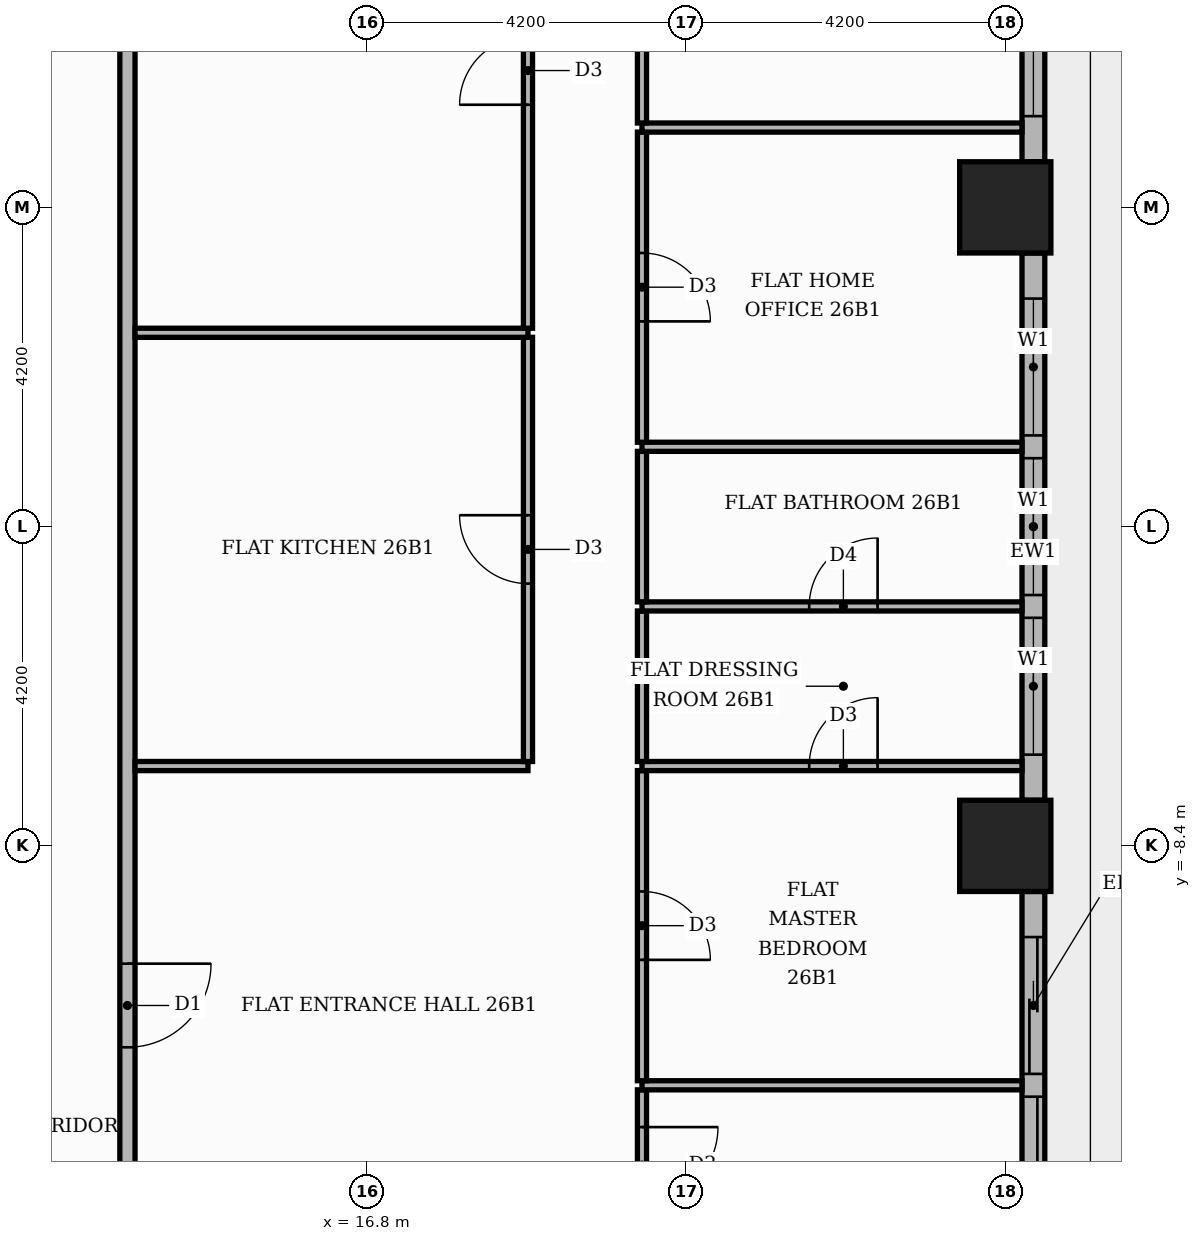
"""IFC4 building model, lengths in metres.
Left out: names, types, materials, properties, quantities, classifications, styles, units other than length and angle.
Written with IfcOpenShell. Run it as: python <this file> out.ifc"""

import sys

from ifc_helpers import new_model, si_unit, direction, frame, frame_2d, origin, origin_2d, place, context, subcontext, project, spatial, rectangle, extrude, element, fill, save


model = new_model("IFC4")
c1 = context("Model", 3, precision=1e-05, world=origin(), true_north=direction((0.0, 1.0)))
c2 = subcontext(c1, "Body", "Model", "MODEL_VIEW")
j1 = project(units=[si_unit("LENGTHUNIT", "METRE"), si_unit("PLANEANGLEUNIT", "RADIAN")], contexts=[c1])
p1 = place(None, origin())
s1 = spatial("IfcSite", under=j1, at=p1, CompositionType="ELEMENT")
p2 = place(p1, origin())
s2 = spatial("IfcBuilding", under=s1, at=p2, CompositionType="ELEMENT")
p3 = place(p2, frame((0.0, 0.0, 110.4)))
s3 = spatial("IfcBuildingStorey", under=s2, at=p3, CompositionType="ELEMENT", Elevation=110.4)
for number, where, z_axis, x_axis in (
    (1, (25.2, 0.0, 0.0), (0.0, 0.0, 1.0), (1.0, 0.0, 0.0)),
    (2, (25.2, -8.4, 0.0), (0.0, 0.0, 1.0), (1.0, 0.0, 0.0)),
):
    element("IfcColumn", number, at=place(p3, frame(where, z_axis=z_axis, x_axis=x_axis)), inside=s3, PredefinedType="COLUMN", context=c2, shape_type="SweptSolid", body=[
        extrude(rectangle(XDim=1.2, YDim=1.2, at=origin_2d()), origin(), (0.0, 0.0, 1.0), 3.9),
    ])
p4 = place(p3, frame((25.57, -16.2, 0.0), z_axis=(0.0, 0.0, 1.0), x_axis=(0.0, 1.0, 0.0)))
e3 = element("IfcWall", 3, at=p4, inside=s3, PredefinedType="STANDARD", context=c2, shape_type="SweptSolid", body=[
    extrude(rectangle(XDim=7.2, YDim=0.3, at=frame_2d((3.6, 0.0))), origin(), (0.0, 0.0, 1.0), 3.48),
])
p5 = place(p4, frame((0.6, 0.0, 0.0)))
e4 = element("IfcOpeningElement", 4, at=p5, cuts=e3, PredefinedType="OPENING", context=c2, shape_type="SweptSolid", body=[
    extrude(rectangle(XDim=3.9, YDim=2.4, at=frame_2d((1.95, 1.2))), frame((0.0, 0.16, 0.0), z_axis=(0.0, -1.0, 0.0), x_axis=(1.0, 0.0, 0.0)), (0.0, 0.0, 1.0), 0.32),
])
p6 = place(p4, frame((4.8, 0.0, 0.0)))
e5 = element("IfcOpeningElement", 5, at=p6, cuts=e3, PredefinedType="OPENING", context=c2, shape_type="SweptSolid", body=[
    extrude(rectangle(XDim=1.8, YDim=2.4, at=frame_2d((0.9, 1.2))), frame((0.0, 0.16, 0.0), z_axis=(0.0, -1.0, 0.0), x_axis=(1.0, 0.0, 0.0)), (0.0, 0.0, 1.0), 0.32),
])
p7 = place(p3, frame((25.57, -7.8, 0.0), z_axis=(0.0, 0.0, 1.0), x_axis=(0.0, 1.0, 0.0)))
e6 = element("IfcWall", 6, at=p7, inside=s3, PredefinedType="STANDARD", context=c2, shape_type="SweptSolid", body=[
    extrude(rectangle(XDim=7.2, YDim=0.3, at=frame_2d((3.6, 0.0))), origin(), (0.0, 0.0, 1.0), 3.48),
])
p8 = place(p7, frame((0.6, 0.0, 0.9)))
e7 = element("IfcOpeningElement", 7, at=p8, cuts=e6, PredefinedType="OPENING", context=c2, shape_type="SweptSolid", body=[
    extrude(rectangle(XDim=1.8, YDim=2.1, at=frame_2d((0.9, 1.05))), frame((0.0, 0.16, 0.0), z_axis=(0.0, -1.0, 0.0), x_axis=(1.0, 0.0, 0.0)), (0.0, 0.0, 1.0), 0.32),
])
p9 = place(p7, frame((2.7, 0.0, 0.9)))
e8 = element("IfcOpeningElement", 8, at=p9, cuts=e6, PredefinedType="OPENING", context=c2, shape_type="SweptSolid", body=[
    extrude(rectangle(XDim=1.8, YDim=2.1, at=frame_2d((0.9, 1.05))), frame((0.0, 0.16, 0.0), z_axis=(0.0, -1.0, 0.0), x_axis=(1.0, 0.0, 0.0)), (0.0, 0.0, 1.0), 0.32),
])
p10 = place(p7, frame((4.8, 0.0, 0.9)))
e9 = element("IfcOpeningElement", 9, at=p10, cuts=e6, PredefinedType="OPENING", context=c2, shape_type="SweptSolid", body=[
    extrude(rectangle(XDim=1.8, YDim=2.1, at=frame_2d((0.9, 1.05))), frame((0.0, 0.16, 0.0), z_axis=(0.0, -1.0, 0.0), x_axis=(1.0, 0.0, 0.0)), (0.0, 0.0, 1.0), 0.32),
])
p11 = place(p3, frame((25.57, 0.6, 0.0), z_axis=(0.0, 0.0, 1.0), x_axis=(0.0, 1.0, 0.0)))
e10 = element("IfcWall", 10, at=p11, inside=s3, PredefinedType="STANDARD", context=c2, shape_type="SweptSolid", body=[
    extrude(rectangle(XDim=7.2, YDim=0.3, at=frame_2d((3.6, 0.0))), origin(), (0.0, 0.0, 1.0), 3.48),
])
p12 = place(p11, frame((0.6, 0.0, 0.9)))
e11 = element("IfcOpeningElement", 11, at=p12, cuts=e10, PredefinedType="OPENING", context=c2, shape_type="SweptSolid", body=[
    extrude(rectangle(XDim=3.9, YDim=2.1, at=frame_2d((1.95, 1.05))), frame((0.0, 0.16, 0.0), z_axis=(0.0, -1.0, 0.0), x_axis=(1.0, 0.0, 0.0)), (0.0, 0.0, 1.0), 0.32),
])
p13 = place(p11, frame((4.8, 0.0, 0.9)))
e12 = element("IfcOpeningElement", 12, at=p13, cuts=e10, PredefinedType="OPENING", context=c2, shape_type="SweptSolid", body=[
    extrude(rectangle(XDim=1.8, YDim=2.1, at=frame_2d((0.9, 1.05))), frame((0.0, 0.16, 0.0), z_axis=(0.0, -1.0, 0.0), x_axis=(1.0, 0.0, 0.0)), (0.0, 0.0, 1.0), 0.32),
])
p14 = place(p3, frame((20.42, -13.59, 0.0), z_axis=(0.0, 0.0, 1.0), x_axis=(0.0, 1.0, 0.0)))
e13 = element("IfcWall", 13, at=p14, inside=s3, PredefinedType="PARTITIONING", context=c2, shape_type="SweptSolid", body=[
    extrude(rectangle(XDim=1.98, YDim=0.12, at=frame_2d((0.99, 0.0))), origin(), (0.0, 0.0, 1.0), 3.48),
])
p15 = place(p14, frame((0.49, 0.0, 0.0)))
e14 = element("IfcOpeningElement", 14, at=p15, cuts=e13, PredefinedType="OPENING", context=c2, shape_type="SweptSolid", body=[
    extrude(rectangle(XDim=1.0, YDim=2.1, at=frame_2d((0.5, 1.05))), frame((0.0, 0.07, 0.0), z_axis=(0.0, -1.0, 0.0), x_axis=(1.0, 0.0, 0.0)), (0.0, 0.0, 1.0), 0.14),
])
p16 = place(p3, frame((13.65, -13.55, 0.0), z_axis=(0.0, 0.0, 1.0), x_axis=(0.0, 1.0, 0.0)))
e15 = element("IfcWall", 15, at=p16, inside=s3, PredefinedType="PARTITIONING", context=c2, shape_type="SweptSolid", body=[
    extrude(rectangle(XDim=27.1, YDim=0.2, at=frame_2d((13.55, 0.0))), origin(), (0.0, 0.0, 1.0), 3.48),
])
p17 = place(p16, frame((2.5, 0.0, 0.0)))
e16 = element("IfcOpeningElement", 16, at=p17, cuts=e15, PredefinedType="OPENING", context=c2, shape_type="SweptSolid", body=[
    extrude(rectangle(XDim=1.1, YDim=2.4, at=frame_2d((0.55, 1.2))), frame((0.0, 0.11, 0.0), z_axis=(0.0, -1.0, 0.0), x_axis=(1.0, 0.0, 0.0)), (0.0, 0.0, 1.0), 0.22),
])
p18 = place(p3, frame((20.42, -11.55, 0.0), z_axis=(0.0, 0.0, 1.0), x_axis=(1.0, 0.0, 0.0)))
e17 = element("IfcWall", 17, at=p18, inside=s3, PredefinedType="PARTITIONING", context=c2, shape_type="SweptSolid", body=[
    extrude(rectangle(XDim=5.0, YDim=0.12, at=frame_2d((2.5, 0.0))), origin(), (0.0, 0.0, 1.0), 3.48),
])
p19 = place(p3, frame((20.42, -11.49, 0.0), z_axis=(0.0, 0.0, 1.0), x_axis=(0.0, 1.0, 0.0)))
e18 = element("IfcWall", 18, at=p19, inside=s3, PredefinedType="PARTITIONING", context=c2, shape_type="SweptSolid", body=[
    extrude(rectangle(XDim=4.08, YDim=0.12, at=frame_2d((2.04, 0.0))), origin(), (0.0, 0.0, 1.0), 3.48),
])
p20 = place(p19, frame((1.59, 0.0, 0.0)))
e19 = element("IfcOpeningElement", 19, at=p20, cuts=e18, PredefinedType="OPENING", context=c2, shape_type="SweptSolid", body=[
    extrude(rectangle(XDim=0.9, YDim=2.1, at=frame_2d((0.45, 1.05))), frame((0.0, 0.07, 0.0), z_axis=(0.0, -1.0, 0.0), x_axis=(1.0, 0.0, 0.0)), (0.0, 0.0, 1.0), 0.14),
])
p21 = place(p3, frame((13.75, -7.35, 0.0), z_axis=(0.0, 0.0, 1.0), x_axis=(1.0, 0.0, 0.0)))
e20 = element("IfcWall", 20, at=p21, inside=s3, PredefinedType="PARTITIONING", context=c2, shape_type="SweptSolid", body=[
    extrude(rectangle(XDim=5.17, YDim=0.12, at=frame_2d((2.585, 0.0))), origin(), (0.0, 0.0, 1.0), 3.48),
])
p22 = place(p3, frame((20.42, -7.35, 0.0), z_axis=(0.0, 0.0, 1.0), x_axis=(1.0, 0.0, 0.0)))
e21 = element("IfcWall", 21, at=p22, inside=s3, PredefinedType="PARTITIONING", context=c2, shape_type="SweptSolid", body=[
    extrude(rectangle(XDim=5.0, YDim=0.12, at=frame_2d((2.5, 0.0))), origin(), (0.0, 0.0, 1.0), 3.48),
])
p23 = place(p22, frame((2.2, 0.0, 0.0)))
e22 = element("IfcOpeningElement", 22, at=p23, cuts=e21, PredefinedType="OPENING", context=c2, shape_type="SweptSolid", body=[
    extrude(rectangle(XDim=0.9, YDim=2.1, at=frame_2d((0.45, 1.05))), frame((0.0, 0.07, 0.0), z_axis=(0.0, -1.0, 0.0), x_axis=(1.0, 0.0, 0.0)), (0.0, 0.0, 1.0), 0.14),
])
p24 = place(p3, frame((18.92, -7.29, 0.0), z_axis=(0.0, 0.0, 1.0), x_axis=(0.0, 1.0, 0.0)))
e23 = element("IfcWall", 23, at=p24, inside=s3, PredefinedType="PARTITIONING", context=c2, shape_type="SweptSolid", body=[
    extrude(rectangle(XDim=5.58, YDim=0.12, at=frame_2d((2.79, 0.0))), origin(), (0.0, 0.0, 1.0), 3.48),
])
p25 = place(p24, frame((2.34, 0.0, 0.0)))
e24 = element("IfcOpeningElement", 24, at=p25, cuts=e23, PredefinedType="OPENING", context=c2, shape_type="SweptSolid", body=[
    extrude(rectangle(XDim=0.9, YDim=2.1, at=frame_2d((0.45, 1.05))), frame((0.0, 0.07, 0.0), z_axis=(0.0, -1.0, 0.0), x_axis=(1.0, 0.0, 0.0)), (0.0, 0.0, 1.0), 0.14),
])
p26 = place(p3, frame((20.42, -7.29, 0.0), z_axis=(0.0, 0.0, 1.0), x_axis=(0.0, 1.0, 0.0)))
e25 = element("IfcWall", 25, at=p26, inside=s3, PredefinedType="PARTITIONING", context=c2, shape_type="SweptSolid", body=[
    extrude(rectangle(XDim=1.98, YDim=0.12, at=frame_2d((0.99, 0.0))), origin(), (0.0, 0.0, 1.0), 3.48),
])
p27 = place(p3, frame((20.42, -5.25, 0.0), z_axis=(0.0, 0.0, 1.0), x_axis=(1.0, 0.0, 0.0)))
e26 = element("IfcWall", 26, at=p27, inside=s3, PredefinedType="PARTITIONING", context=c2, shape_type="SweptSolid", body=[
    extrude(rectangle(XDim=5.0, YDim=0.12, at=frame_2d((2.5, 0.0))), origin(), (0.0, 0.0, 1.0), 3.48),
])
p28 = place(p27, frame((2.2, 0.0, 0.0)))
e27 = element("IfcOpeningElement", 27, at=p28, cuts=e26, PredefinedType="OPENING", context=c2, shape_type="SweptSolid", body=[
    extrude(rectangle(XDim=0.9, YDim=2.1, at=frame_2d((0.45, 1.05))), frame((0.0, 0.07, 0.0), z_axis=(0.0, -1.0, 0.0), x_axis=(1.0, 0.0, 0.0)), (0.0, 0.0, 1.0), 0.14),
])
p29 = place(p3, frame((20.42, -5.19, 0.0), z_axis=(0.0, 0.0, 1.0), x_axis=(0.0, 1.0, 0.0)))
e28 = element("IfcWall", 28, at=p29, inside=s3, PredefinedType="PARTITIONING", context=c2, shape_type="SweptSolid", body=[
    extrude(rectangle(XDim=1.98, YDim=0.12, at=frame_2d((0.99, 0.0))), origin(), (0.0, 0.0, 1.0), 3.48),
])
p30 = place(p3, frame((20.42, -3.15, 0.0), z_axis=(0.0, 0.0, 1.0), x_axis=(1.0, 0.0, 0.0)))
e29 = element("IfcWall", 29, at=p30, inside=s3, PredefinedType="PARTITIONING", context=c2, shape_type="SweptSolid", body=[
    extrude(rectangle(XDim=5.0, YDim=0.12, at=frame_2d((2.5, 0.0))), origin(), (0.0, 0.0, 1.0), 3.48),
])
p31 = place(p3, frame((20.42, -3.09, 0.0), z_axis=(0.0, 0.0, 1.0), x_axis=(0.0, 1.0, 0.0)))
e30 = element("IfcWall", 30, at=p31, inside=s3, PredefinedType="PARTITIONING", context=c2, shape_type="SweptSolid", body=[
    extrude(rectangle(XDim=4.08, YDim=0.12, at=frame_2d((2.04, 0.0))), origin(), (0.0, 0.0, 1.0), 3.48),
])
p32 = place(p31, frame((1.59, 0.0, 0.0)))
e31 = element("IfcOpeningElement", 31, at=p32, cuts=e30, PredefinedType="OPENING", context=c2, shape_type="SweptSolid", body=[
    extrude(rectangle(XDim=0.9, YDim=2.1, at=frame_2d((0.45, 1.05))), frame((0.0, 0.07, 0.0), z_axis=(0.0, -1.0, 0.0), x_axis=(1.0, 0.0, 0.0)), (0.0, 0.0, 1.0), 0.14),
])
p33 = place(p3, frame((13.75, -1.65, 0.0), z_axis=(0.0, 0.0, 1.0), x_axis=(1.0, 0.0, 0.0)))
e32 = element("IfcWall", 32, at=p33, inside=s3, PredefinedType="PARTITIONING", context=c2, shape_type="SweptSolid", body=[
    extrude(rectangle(XDim=5.17, YDim=0.12, at=frame_2d((2.585, 0.0))), origin(), (0.0, 0.0, 1.0), 3.48),
])
p34 = place(p3, frame((18.92, -1.59, 0.0), z_axis=(0.0, 0.0, 1.0), x_axis=(0.0, 1.0, 0.0)))
e33 = element("IfcWall", 33, at=p34, inside=s3, PredefinedType="PARTITIONING", context=c2, shape_type="SweptSolid", body=[
    extrude(rectangle(XDim=6.78, YDim=0.12, at=frame_2d((3.39, 0.0))), origin(), (0.0, 0.0, 1.0), 3.48),
])
p35 = place(p34, frame((2.94, 0.0, 0.0)))
e34 = element("IfcOpeningElement", 34, at=p35, cuts=e33, PredefinedType="OPENING", context=c2, shape_type="SweptSolid", body=[
    extrude(rectangle(XDim=0.9, YDim=2.1, at=frame_2d((0.45, 1.05))), frame((0.0, 0.07, 0.0), z_axis=(0.0, -1.0, 0.0), x_axis=(1.0, 0.0, 0.0)), (0.0, 0.0, 1.0), 0.14),
])
p36 = place(p3, frame((20.42, 1.05, 0.0), z_axis=(0.0, 0.0, 1.0), x_axis=(1.0, 0.0, 0.0)))
e35 = element("IfcWall", 35, at=p36, inside=s3, PredefinedType="PARTITIONING", context=c2, shape_type="SweptSolid", body=[
    extrude(rectangle(XDim=5.0, YDim=0.12, at=frame_2d((2.5, 0.0))), origin(), (0.0, 0.0, 1.0), 3.48),
])
p37 = place(p3, frame((20.42, 1.11, 0.0), z_axis=(0.0, 0.0, 1.0), x_axis=(0.0, 1.0, 0.0)))
e36 = element("IfcWall", 36, at=p37, inside=s3, PredefinedType="PARTITIONING", context=c2, shape_type="SweptSolid", body=[
    extrude(rectangle(XDim=4.08, YDim=0.12, at=frame_2d((2.04, 0.0))), origin(), (0.0, 0.0, 1.0), 3.48),
])
p38 = place(p37, frame((1.59, 0.0, 0.0)))
e37 = element("IfcOpeningElement", 37, at=p38, cuts=e36, PredefinedType="OPENING", context=c2, shape_type="SweptSolid", body=[
    extrude(rectangle(XDim=0.9, YDim=2.1, at=frame_2d((0.45, 1.05))), frame((0.0, 0.07, 0.0), z_axis=(0.0, -1.0, 0.0), x_axis=(1.0, 0.0, 0.0)), (0.0, 0.0, 1.0), 0.14),
])
p39 = place(p5, origin())
e38 = element("IfcDoor", 38, at=p39, inside=s3, OperationType="SLIDING_TO_LEFT", PredefinedType="DOOR", context=c2, shape_type="SweptSolid", body=[
    extrude(rectangle(XDim=3.9, YDim=2.4, at=frame_2d((1.95, 1.2))), frame((0.0, 0.025, 0.0), z_axis=(0.0, -1.0, 0.0), x_axis=(1.0, 0.0, 0.0)), (0.0, 0.0, 1.0), 0.05),
])
fill(e4, e38)
p40 = place(p6, origin())
e39 = element("IfcDoor", 39, at=p40, inside=s3, OperationType="SLIDING_TO_RIGHT", PredefinedType="DOOR", context=c2, shape_type="SweptSolid", body=[
    extrude(rectangle(XDim=1.8, YDim=2.4, at=frame_2d((0.9, 1.2))), frame((0.0, 0.025, 0.0), z_axis=(0.0, -1.0, 0.0), x_axis=(1.0, 0.0, 0.0)), (0.0, 0.0, 1.0), 0.05),
])
fill(e5, e39)
p41 = place(p8, origin())
e40 = element("IfcWindow", 40, at=p41, inside=s3, PartitioningType="SINGLE_PANEL", PredefinedType="WINDOW", context=c2, shape_type="SweptSolid", body=[
    extrude(rectangle(XDim=1.8, YDim=2.1, at=frame_2d((0.9, 1.05))), frame((0.0, 0.03, 0.0), z_axis=(0.0, -1.0, 0.0), x_axis=(1.0, 0.0, 0.0)), (0.0, 0.0, 1.0), 0.06),
])
fill(e7, e40)
p42 = place(p9, origin())
e41 = element("IfcWindow", 41, at=p42, inside=s3, PartitioningType="SINGLE_PANEL", PredefinedType="WINDOW", context=c2, shape_type="SweptSolid", body=[
    extrude(rectangle(XDim=1.8, YDim=2.1, at=frame_2d((0.9, 1.05))), frame((0.0, 0.03, 0.0), z_axis=(0.0, -1.0, 0.0), x_axis=(1.0, 0.0, 0.0)), (0.0, 0.0, 1.0), 0.06),
])
fill(e8, e41)
p43 = place(p10, origin())
e42 = element("IfcWindow", 42, at=p43, inside=s3, PartitioningType="SINGLE_PANEL", PredefinedType="WINDOW", context=c2, shape_type="SweptSolid", body=[
    extrude(rectangle(XDim=1.8, YDim=2.1, at=frame_2d((0.9, 1.05))), frame((0.0, 0.03, 0.0), z_axis=(0.0, -1.0, 0.0), x_axis=(1.0, 0.0, 0.0)), (0.0, 0.0, 1.0), 0.06),
])
fill(e9, e42)
p44 = place(p12, origin())
e43 = element("IfcWindow", 43, at=p44, inside=s3, PartitioningType="SINGLE_PANEL", PredefinedType="WINDOW", context=c2, shape_type="SweptSolid", body=[
    extrude(rectangle(XDim=3.9, YDim=2.1, at=frame_2d((1.95, 1.05))), frame((0.0, 0.03, 0.0), z_axis=(0.0, -1.0, 0.0), x_axis=(1.0, 0.0, 0.0)), (0.0, 0.0, 1.0), 0.06),
])
fill(e11, e43)
p45 = place(p17, frame((1.1, 0.0, 0.0), z_axis=(0.0, 0.0, 1.0), x_axis=(-1.0, 0.0, 0.0)))
e44 = element("IfcDoor", 44, at=p45, inside=s3, OperationType="SINGLE_SWING_RIGHT", PredefinedType="DOOR", context=c2, shape_type="SweptSolid", body=[
    extrude(rectangle(XDim=1.1, YDim=2.4, at=frame_2d((0.55, 1.2))), frame((0.0, 0.025, 0.0), z_axis=(0.0, -1.0, 0.0), x_axis=(1.0, 0.0, 0.0)), (0.0, 0.0, 1.0), 0.05),
])
fill(e16, e44)
p46 = place(p25, origin())
e45 = element("IfcDoor", 45, at=p46, inside=s3, OperationType="SINGLE_SWING_RIGHT", PredefinedType="DOOR", context=c2, shape_type="SweptSolid", body=[
    extrude(rectangle(XDim=0.9, YDim=2.1, at=frame_2d((0.45, 1.05))), frame((0.0, 0.025, 0.0), z_axis=(0.0, -1.0, 0.0), x_axis=(1.0, 0.0, 0.0)), (0.0, 0.0, 1.0), 0.05),
])
fill(e24, e45)
p47 = place(p35, origin())
e46 = element("IfcDoor", 46, at=p47, inside=s3, OperationType="SINGLE_SWING_LEFT", PredefinedType="DOOR", context=c2, shape_type="SweptSolid", body=[
    extrude(rectangle(XDim=0.9, YDim=2.1, at=frame_2d((0.45, 1.05))), frame((0.0, 0.025, 0.0), z_axis=(0.0, -1.0, 0.0), x_axis=(1.0, 0.0, 0.0)), (0.0, 0.0, 1.0), 0.05),
])
fill(e34, e46)
p48 = place(p15, frame((1.0, 0.0, 0.0), z_axis=(0.0, 0.0, 1.0), x_axis=(-1.0, 0.0, 0.0)))
e47 = element("IfcDoor", 47, at=p48, inside=s3, OperationType="SINGLE_SWING_RIGHT", PredefinedType="DOOR", context=c2, shape_type="SweptSolid", body=[
    extrude(rectangle(XDim=1.0, YDim=2.1, at=frame_2d((0.5, 1.05))), frame((0.0, 0.025, 0.0), z_axis=(0.0, -1.0, 0.0), x_axis=(1.0, 0.0, 0.0)), (0.0, 0.0, 1.0), 0.05),
])
fill(e14, e47)
p49 = place(p20, frame((0.9, 0.0, 0.0), z_axis=(0.0, 0.0, 1.0), x_axis=(-1.0, 0.0, 0.0)))
e48 = element("IfcDoor", 48, at=p49, inside=s3, OperationType="SINGLE_SWING_LEFT", PredefinedType="DOOR", context=c2, shape_type="SweptSolid", body=[
    extrude(rectangle(XDim=0.9, YDim=2.1, at=frame_2d((0.45, 1.05))), frame((0.0, 0.025, 0.0), z_axis=(0.0, -1.0, 0.0), x_axis=(1.0, 0.0, 0.0)), (0.0, 0.0, 1.0), 0.05),
])
fill(e19, e48)
p50 = place(p23, origin())
e49 = element("IfcDoor", 49, at=p50, inside=s3, OperationType="SINGLE_SWING_RIGHT", PredefinedType="DOOR", context=c2, shape_type="SweptSolid", body=[
    extrude(rectangle(XDim=0.9, YDim=2.1, at=frame_2d((0.45, 1.05))), frame((0.0, 0.025, 0.0), z_axis=(0.0, -1.0, 0.0), x_axis=(1.0, 0.0, 0.0)), (0.0, 0.0, 1.0), 0.05),
])
fill(e22, e49)
p51 = place(p28, origin())
e50 = element("IfcDoor", 50, at=p51, inside=s3, OperationType="SINGLE_SWING_RIGHT", PredefinedType="DOOR", context=c2, shape_type="SweptSolid", body=[
    extrude(rectangle(XDim=0.9, YDim=2.1, at=frame_2d((0.45, 1.05))), frame((0.0, 0.025, 0.0), z_axis=(0.0, -1.0, 0.0), x_axis=(1.0, 0.0, 0.0)), (0.0, 0.0, 1.0), 0.05),
])
fill(e27, e50)
p52 = place(p32, frame((0.9, 0.0, 0.0), z_axis=(0.0, 0.0, 1.0), x_axis=(-1.0, 0.0, 0.0)))
e51 = element("IfcDoor", 51, at=p52, inside=s3, OperationType="SINGLE_SWING_LEFT", PredefinedType="DOOR", context=c2, shape_type="SweptSolid", body=[
    extrude(rectangle(XDim=0.9, YDim=2.1, at=frame_2d((0.45, 1.05))), frame((0.0, 0.025, 0.0), z_axis=(0.0, -1.0, 0.0), x_axis=(1.0, 0.0, 0.0)), (0.0, 0.0, 1.0), 0.05),
])
fill(e31, e51)
save(model, sys.argv[1])
